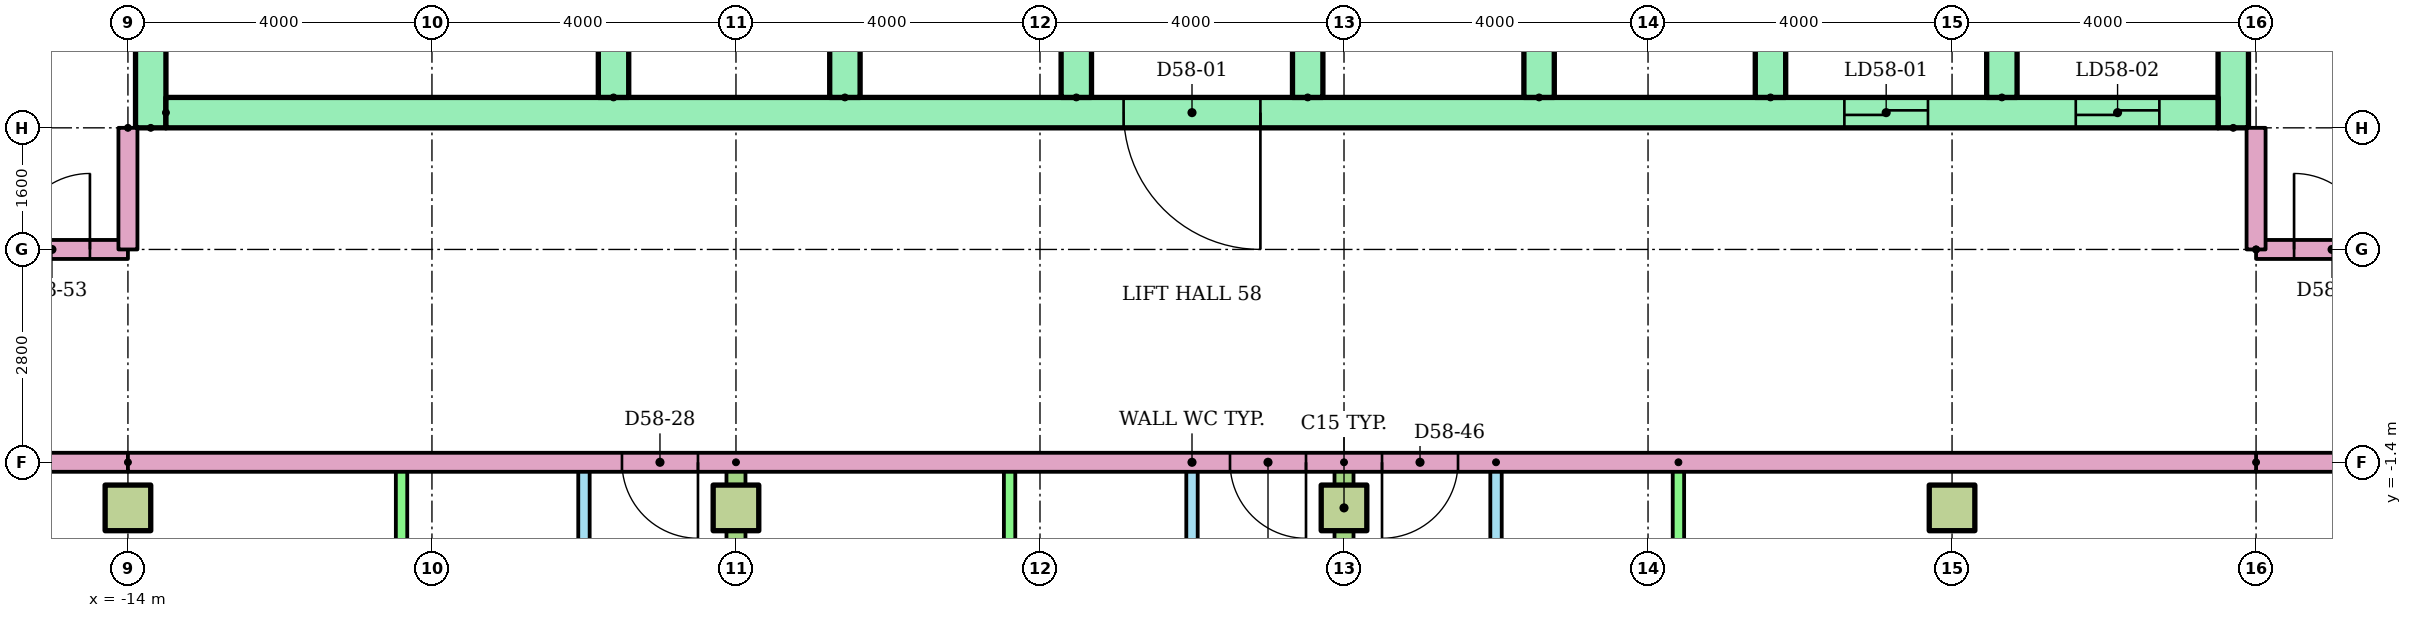
"""IFC4 building model, lengths in metres.
Left out: names, types, materials, properties, quantities, classifications, styles, units other than length and angle.
Written with IfcOpenShell. Run it as: python <this file> out.ifc"""

import sys

from ifc_helpers import new_model, si_unit, direction, frame, frame_2d, origin, origin_2d, place, context, subcontext, project, spatial, rectangle, extrude, element, fill, save


model = new_model("IFC4")
c1 = context("Model", 3, precision=1e-05, world=origin(), true_north=direction((0.0, 1.0)))
c2 = subcontext(c1, "Body", "Model", "MODEL_VIEW")
j1 = project(units=[si_unit("LENGTHUNIT", "METRE"), si_unit("PLANEANGLEUNIT", "RADIAN")], contexts=[c1])
p1 = place(None, origin())
s1 = spatial("IfcSite", under=j1, at=p1, CompositionType="ELEMENT")
p2 = place(p1, origin())
s2 = spatial("IfcBuilding", under=s1, at=p2, CompositionType="ELEMENT")
p3 = place(p2, frame((0.0, 0.0, 223.6)))
s3 = spatial("IfcBuildingStorey", under=s2, at=p3, CompositionType="ELEMENT", Elevation=223.6)
for number, where in (
    (1, (-14.0, -2.0, 0.0)),
    (2, (-6.0, -2.0, 0.0)),
    (3, (2.0, -2.0, 0.0)),
    (4, (10.0, -2.0, 0.0)),
):
    element("IfcColumn", number, at=place(p3, frame(where)), inside=s3, PredefinedType="COLUMN", context=c2, shape_type="SweptSolid", body=[
        extrude(rectangle(XDim=0.6, YDim=0.6, at=origin_2d()), origin(), (0.0, 0.0, 1.0), 3.2),
    ])
for number, where, z_axis, x_axis in (
    (5, (-13.7, 3.0, 0.0), (0.0, 0.0, 1.0), (0.0, 1.0, 0.0)),
    (6, (13.7, 3.0, 0.0), (0.0, 0.0, 1.0), (0.0, 1.0, 0.0)),
):
    element("IfcWall", number, at=place(p3, frame(where, z_axis=z_axis, x_axis=x_axis)), inside=s3, PredefinedType="SHEAR", context=c2, shape_type="SweptSolid", body=[
        extrude(rectangle(XDim=17.0, YDim=0.4, at=frame_2d((8.5, 0.0))), origin(), (0.0, 0.0, 1.0), 2.92),
    ])
p4 = place(p3, frame((-13.5, 3.2, 0.0)))
e7 = element("IfcWall", 7, at=p4, inside=s3, PredefinedType="SHEAR", context=c2, shape_type="SweptSolid", body=[
    extrude(rectangle(XDim=27.0, YDim=0.4, at=frame_2d((13.5, 0.0))), origin(), (0.0, 0.0, 1.0), 2.92),
])
p5 = place(p4, frame((22.083, 0.0, 0.0)))
e8 = element("IfcOpeningElement", 8, at=p5, cuts=e7, PredefinedType="OPENING", context=c2, shape_type="SweptSolid", body=[
    extrude(rectangle(XDim=1.1, YDim=2.1, at=frame_2d((0.55, 1.05))), frame((0.0, 0.21, 0.0), z_axis=(0.0, -1.0, 0.0), x_axis=(1.0, 0.0, 0.0)), (0.0, 0.0, 1.0), 0.42),
])
p6 = place(p4, frame((25.128, 0.0, 0.0)))
e9 = element("IfcOpeningElement", 9, at=p6, cuts=e7, PredefinedType="OPENING", context=c2, shape_type="SweptSolid", body=[
    extrude(rectangle(XDim=1.1, YDim=2.1, at=frame_2d((0.55, 1.05))), frame((0.0, 0.21, 0.0), z_axis=(0.0, -1.0, 0.0), x_axis=(1.0, 0.0, 0.0)), (0.0, 0.0, 1.0), 0.42),
])
p7 = place(p4, frame((12.6, 0.0, 0.0)))
e10 = element("IfcOpeningElement", 10, at=p7, cuts=e7, PredefinedType="OPENING", context=c2, shape_type="SweptSolid", body=[
    extrude(rectangle(XDim=1.8, YDim=2.1, at=frame_2d((0.9, 1.05))), frame((0.0, 0.21, 0.0), z_axis=(0.0, -1.0, 0.0), x_axis=(1.0, 0.0, 0.0)), (0.0, 0.0, 1.0), 0.42),
])
for number, where, z_axis, x_axis in (
    (11, (-7.611, 3.4, 0.0), (0.0, 0.0, 1.0), (0.0, 1.0, 0.0)),
    (12, (-4.567, 3.4, 0.0), (0.0, 0.0, 1.0), (0.0, 1.0, 0.0)),
    (13, (-1.522, 3.4, 0.0), (0.0, 0.0, 1.0), (0.0, 1.0, 0.0)),
    (14, (1.522, 3.4, 0.0), (0.0, 0.0, 1.0), (0.0, 1.0, 0.0)),
    (15, (4.567, 3.4, 0.0), (0.0, 0.0, 1.0), (0.0, 1.0, 0.0)),
    (16, (7.611, 3.4, 0.0), (0.0, 0.0, 1.0), (0.0, 1.0, 0.0)),
    (17, (10.656, 3.4, 0.0), (0.0, 0.0, 1.0), (0.0, 1.0, 0.0)),
):
    element("IfcWall", number, at=place(p3, frame(where, z_axis=z_axis, x_axis=x_axis)), inside=s3, PredefinedType="SHEAR", context=c2, shape_type="SweptSolid", body=[
        extrude(rectangle(XDim=3.0, YDim=0.4, at=frame_2d((1.5, 0.0))), origin(), (0.0, 0.0, 1.0), 2.92),
    ])
p8 = place(p3, frame((-8.0, -9.4, 0.0), z_axis=(0.0, 0.0, 1.0), x_axis=(0.0, 1.0, 0.0)))
e18 = element("IfcWall", 18, at=p8, inside=s3, PredefinedType="PARTITIONING", context=c2, shape_type="SweptSolid", body=[
    extrude(rectangle(XDim=8.0, YDim=0.15, at=frame_2d((4.0, 0.0))), origin(), (0.0, 0.0, 1.0), 2.4),
])
p9 = place(p8, frame((5.3, 0.0, 0.0)))
e19 = element("IfcOpeningElement", 19, at=p9, cuts=e18, PredefinedType="OPENING", context=c2, shape_type="SweptSolid", body=[
    extrude(rectangle(XDim=0.9, YDim=2.1, at=frame_2d((0.45, 1.05))), frame((0.0, 0.085, 0.0), z_axis=(0.0, -1.0, 0.0), x_axis=(1.0, 0.0, 0.0)), (0.0, 0.0, 1.0), 0.17),
])
p10 = place(p8, frame((1.35, 0.0, 0.0)))
e20 = element("IfcOpeningElement", 20, at=p10, cuts=e18, PredefinedType="OPENING", context=c2, shape_type="SweptSolid", body=[
    extrude(rectangle(XDim=0.8, YDim=2.1, at=frame_2d((0.4, 1.05))), frame((0.0, 0.085, 0.0), z_axis=(0.0, -1.0, 0.0), x_axis=(1.0, 0.0, 0.0)), (0.0, 0.0, 1.0), 0.17),
])
p11 = place(p3, frame((-10.4, -9.4, 0.0), z_axis=(0.0, 0.0, 1.0), x_axis=(0.0, 1.0, 0.0)))
e21 = element("IfcWall", 21, at=p11, inside=s3, PredefinedType="PARTITIONING", context=c2, shape_type="SweptSolid", body=[
    extrude(rectangle(XDim=8.0, YDim=0.15, at=frame_2d((4.0, 0.0))), origin(), (0.0, 0.0, 1.0), 2.4),
])
p12 = place(p3, frame((0.0, -9.4, 0.0), z_axis=(0.0, 0.0, 1.0), x_axis=(0.0, 1.0, 0.0)))
e22 = element("IfcWall", 22, at=p12, inside=s3, PredefinedType="PARTITIONING", context=c2, shape_type="SweptSolid", body=[
    extrude(rectangle(XDim=8.0, YDim=0.15, at=frame_2d((4.0, 0.0))), origin(), (0.0, 0.0, 1.0), 2.4),
])
p13 = place(p12, frame((5.3, 0.0, 0.0)))
e23 = element("IfcOpeningElement", 23, at=p13, cuts=e22, PredefinedType="OPENING", context=c2, shape_type="SweptSolid", body=[
    extrude(rectangle(XDim=0.9, YDim=2.1, at=frame_2d((0.45, 1.05))), frame((0.0, 0.085, 0.0), z_axis=(0.0, -1.0, 0.0), x_axis=(1.0, 0.0, 0.0)), (0.0, 0.0, 1.0), 0.17),
])
p14 = place(p12, frame((1.35, 0.0, 0.0)))
e24 = element("IfcOpeningElement", 24, at=p14, cuts=e22, PredefinedType="OPENING", context=c2, shape_type="SweptSolid", body=[
    extrude(rectangle(XDim=0.8, YDim=2.1, at=frame_2d((0.4, 1.05))), frame((0.0, 0.085, 0.0), z_axis=(0.0, -1.0, 0.0), x_axis=(1.0, 0.0, 0.0)), (0.0, 0.0, 1.0), 0.17),
])
p15 = place(p3, frame((-2.4, -9.4, 0.0), z_axis=(0.0, 0.0, 1.0), x_axis=(0.0, 1.0, 0.0)))
e25 = element("IfcWall", 25, at=p15, inside=s3, PredefinedType="PARTITIONING", context=c2, shape_type="SweptSolid", body=[
    extrude(rectangle(XDim=8.0, YDim=0.15, at=frame_2d((4.0, 0.0))), origin(), (0.0, 0.0, 1.0), 2.4),
])
p16 = place(p3, frame((-6.0, -1.4, 0.0), z_axis=(0.0, 0.0, 1.0), x_axis=(0.0, -1.0, 0.0)))
e26 = element("IfcWall", 26, at=p16, inside=s3, PredefinedType="PARTITIONING", context=c2, shape_type="SweptSolid", body=[
    extrude(rectangle(XDim=15.11, YDim=0.25, at=frame_2d((7.555, 0.0))), origin(), (0.0, 0.0, 1.0), 2.4),
])
p17 = place(p3, frame((4.0, -1.4, 0.0), z_axis=(0.0, 0.0, 1.0), x_axis=(0.0, -1.0, 0.0)))
e27 = element("IfcWall", 27, at=p17, inside=s3, PredefinedType="PARTITIONING", context=c2, shape_type="SweptSolid", body=[
    extrude(rectangle(XDim=8.0, YDim=0.15, at=frame_2d((4.0, 0.0))), origin(), (0.0, 0.0, 1.0), 2.4),
])
p18 = place(p17, frame((1.8, 0.0, 0.0)))
e28 = element("IfcOpeningElement", 28, at=p18, cuts=e27, PredefinedType="OPENING", context=c2, shape_type="SweptSolid", body=[
    extrude(rectangle(XDim=0.9, YDim=2.1, at=frame_2d((0.45, 1.05))), frame((0.0, 0.085, 0.0), z_axis=(0.0, -1.0, 0.0), x_axis=(1.0, 0.0, 0.0)), (0.0, 0.0, 1.0), 0.17),
])
p19 = place(p17, frame((5.85, 0.0, 0.0)))
e29 = element("IfcOpeningElement", 29, at=p19, cuts=e27, PredefinedType="OPENING", context=c2, shape_type="SweptSolid", body=[
    extrude(rectangle(XDim=0.8, YDim=2.1, at=frame_2d((0.4, 1.05))), frame((0.0, 0.085, 0.0), z_axis=(0.0, -1.0, 0.0), x_axis=(1.0, 0.0, 0.0)), (0.0, 0.0, 1.0), 0.17),
])
p20 = place(p3, frame((6.4, -1.4, 0.0), z_axis=(0.0, 0.0, 1.0), x_axis=(0.0, -1.0, 0.0)))
e30 = element("IfcWall", 30, at=p20, inside=s3, PredefinedType="PARTITIONING", context=c2, shape_type="SweptSolid", body=[
    extrude(rectangle(XDim=8.0, YDim=0.15, at=frame_2d((4.0, 0.0))), origin(), (0.0, 0.0, 1.0), 2.4),
])
p21 = place(p3, frame((2.0, -1.4, 0.0), z_axis=(0.0, 0.0, 1.0), x_axis=(0.0, -1.0, 0.0)))
e31 = element("IfcWall", 31, at=p21, inside=s3, PredefinedType="PARTITIONING", context=c2, shape_type="SweptSolid", body=[
    extrude(rectangle(XDim=15.11, YDim=0.25, at=frame_2d((7.555, 0.0))), origin(), (0.0, 0.0, 1.0), 2.4),
])
for number, where, z_axis, x_axis in (
    (32, (-14.0, -1.4, 0.0), (0.0, 0.0, 1.0), (-1.0, 0.0, 0.0)),
    (33, (28.92, -1.4, 0.0), (0.0, 0.0, 1.0), (-1.0, 0.0, 0.0)),
):
    element("IfcWall", number, at=place(p3, frame(where, z_axis=z_axis, x_axis=x_axis)), inside=s3, PredefinedType="PARTITIONING", context=c2, shape_type="SweptSolid", body=[
        extrude(rectangle(XDim=14.92, YDim=0.25, at=frame_2d((7.46, 0.0))), origin(), (0.0, 0.0, 1.0), 2.4),
    ])
p22 = place(p3, frame((-28.92, 1.4, 0.0)))
e34 = element("IfcWall", 34, at=p22, inside=s3, PredefinedType="PARTITIONING", context=c2, shape_type="SweptSolid", body=[
    extrude(rectangle(XDim=14.92, YDim=0.25, at=frame_2d((7.46, 0.0))), origin(), (0.0, 0.0, 1.0), 2.4),
])
p23 = place(p22, frame((13.42, 0.0, 0.0)))
e35 = element("IfcOpeningElement", 35, at=p23, cuts=e34, PredefinedType="OPENING", context=c2, shape_type="SweptSolid", body=[
    extrude(rectangle(XDim=1.0, YDim=2.1, at=frame_2d((0.5, 1.05))), frame((0.0, 0.135, 0.0), z_axis=(0.0, -1.0, 0.0), x_axis=(1.0, 0.0, 0.0)), (0.0, 0.0, 1.0), 0.27),
])
p24 = place(p3, frame((14.0, 1.4, 0.0)))
e36 = element("IfcWall", 36, at=p24, inside=s3, PredefinedType="PARTITIONING", context=c2, shape_type="SweptSolid", body=[
    extrude(rectangle(XDim=14.92, YDim=0.25, at=frame_2d((7.46, 0.0))), origin(), (0.0, 0.0, 1.0), 2.4),
])
p25 = place(p24, frame((0.5, 0.0, 0.0)))
e37 = element("IfcOpeningElement", 37, at=p25, cuts=e36, PredefinedType="OPENING", context=c2, shape_type="SweptSolid", body=[
    extrude(rectangle(XDim=1.0, YDim=2.1, at=frame_2d((0.5, 1.05))), frame((0.0, 0.135, 0.0), z_axis=(0.0, -1.0, 0.0), x_axis=(1.0, 0.0, 0.0)), (0.0, 0.0, 1.0), 0.27),
])
p26 = place(p3, frame((14.0, -1.4, 0.0), z_axis=(0.0, 0.0, 1.0), x_axis=(-1.0, 0.0, 0.0)))
e38 = element("IfcWall", 38, at=p26, inside=s3, PredefinedType="PARTITIONING", context=c2, shape_type="SweptSolid", body=[
    extrude(rectangle(XDim=28.0, YDim=0.25, at=frame_2d((14.0, 0.0))), origin(), (0.0, 0.0, 1.0), 2.4),
])
p27 = place(p26, frame((20.5, 0.0, 0.0)))
e39 = element("IfcOpeningElement", 39, at=p27, cuts=e38, PredefinedType="OPENING", context=c2, shape_type="SweptSolid", body=[
    extrude(rectangle(XDim=1.0, YDim=2.1, at=frame_2d((0.5, 1.05))), frame((0.0, 0.135, 0.0), z_axis=(0.0, -1.0, 0.0), x_axis=(1.0, 0.0, 0.0)), (0.0, 0.0, 1.0), 0.27),
])
p28 = place(p26, frame((12.5, 0.0, 0.0)))
e40 = element("IfcOpeningElement", 40, at=p28, cuts=e38, PredefinedType="OPENING", context=c2, shape_type="SweptSolid", body=[
    extrude(rectangle(XDim=1.0, YDim=2.1, at=frame_2d((0.5, 1.05))), frame((0.0, 0.135, 0.0), z_axis=(0.0, -1.0, 0.0), x_axis=(1.0, 0.0, 0.0)), (0.0, 0.0, 1.0), 0.27),
])
p29 = place(p26, frame((10.5, 0.0, 0.0)))
e41 = element("IfcOpeningElement", 41, at=p29, cuts=e38, PredefinedType="OPENING", context=c2, shape_type="SweptSolid", body=[
    extrude(rectangle(XDim=1.0, YDim=2.1, at=frame_2d((0.5, 1.05))), frame((0.0, 0.135, 0.0), z_axis=(0.0, -1.0, 0.0), x_axis=(1.0, 0.0, 0.0)), (0.0, 0.0, 1.0), 0.27),
])
for number, where, z_axis, x_axis in (
    (42, (-14.0, 3.0, 0.0), (0.0, 0.0, 1.0), (0.0, -1.0, 0.0)),
    (43, (14.0, 1.4, 0.0), (0.0, 0.0, 1.0), (0.0, 1.0, 0.0)),
):
    element("IfcWall", number, at=place(p3, frame(where, z_axis=z_axis, x_axis=x_axis)), inside=s3, PredefinedType="PARTITIONING", context=c2, shape_type="SweptSolid", body=[
        extrude(rectangle(XDim=1.6, YDim=0.25, at=frame_2d((0.8, 0.0))), origin(), (0.0, 0.0, 1.0), 2.4),
    ])
p30 = place(p5, origin())
e44 = element("IfcDoor", 44, at=p30, inside=s3, OperationType="SLIDING_TO_LEFT", PredefinedType="DOOR", context=c2, shape_type="SweptSolid", body=[
    extrude(rectangle(XDim=1.1, YDim=2.1, at=frame_2d((0.55, 1.05))), frame((0.0, 0.025, 0.0), z_axis=(0.0, -1.0, 0.0), x_axis=(1.0, 0.0, 0.0)), (0.0, 0.0, 1.0), 0.05),
])
fill(e8, e44)
p31 = place(p6, origin())
e45 = element("IfcDoor", 45, at=p31, inside=s3, OperationType="SLIDING_TO_LEFT", PredefinedType="DOOR", context=c2, shape_type="SweptSolid", body=[
    extrude(rectangle(XDim=1.1, YDim=2.1, at=frame_2d((0.55, 1.05))), frame((0.0, 0.025, 0.0), z_axis=(0.0, -1.0, 0.0), x_axis=(1.0, 0.0, 0.0)), (0.0, 0.0, 1.0), 0.05),
])
fill(e9, e45)
p32 = place(p7, frame((1.8, 0.0, 0.0), z_axis=(0.0, 0.0, 1.0), x_axis=(-1.0, 0.0, 0.0)))
e46 = element("IfcDoor", 46, at=p32, inside=s3, OperationType="DOUBLE_DOOR_SINGLE_SWING", PredefinedType="DOOR", context=c2, shape_type="SweptSolid", body=[
    extrude(rectangle(XDim=1.8, YDim=2.1, at=frame_2d((0.9, 1.05))), frame((0.0, 0.025, 0.0), z_axis=(0.0, -1.0, 0.0), x_axis=(1.0, 0.0, 0.0)), (0.0, 0.0, 1.0), 0.05),
])
fill(e10, e46)
p33 = place(p27, origin())
e47 = element("IfcDoor", 47, at=p33, inside=s3, OperationType="SINGLE_SWING_LEFT", PredefinedType="DOOR", context=c2, shape_type="SweptSolid", body=[
    extrude(rectangle(XDim=1.0, YDim=2.1, at=frame_2d((0.5, 1.05))), frame((0.0, 0.025, 0.0), z_axis=(0.0, -1.0, 0.0), x_axis=(1.0, 0.0, 0.0)), (0.0, 0.0, 1.0), 0.05),
])
fill(e39, e47)
p34 = place(p28, origin())
e48 = element("IfcDoor", 48, at=p34, inside=s3, OperationType="SINGLE_SWING_LEFT", PredefinedType="DOOR", context=c2, shape_type="SweptSolid", body=[
    extrude(rectangle(XDim=1.0, YDim=2.1, at=frame_2d((0.5, 1.05))), frame((0.0, 0.025, 0.0), z_axis=(0.0, -1.0, 0.0), x_axis=(1.0, 0.0, 0.0)), (0.0, 0.0, 1.0), 0.05),
])
fill(e40, e48)
p35 = place(p29, origin())
e49 = element("IfcDoor", 49, at=p35, inside=s3, OperationType="SINGLE_SWING_RIGHT", PredefinedType="DOOR", context=c2, shape_type="SweptSolid", body=[
    extrude(rectangle(XDim=1.0, YDim=2.1, at=frame_2d((0.5, 1.05))), frame((0.0, 0.025, 0.0), z_axis=(0.0, -1.0, 0.0), x_axis=(1.0, 0.0, 0.0)), (0.0, 0.0, 1.0), 0.05),
])
fill(e41, e49)
p36 = place(p23, origin())
e50 = element("IfcDoor", 50, at=p36, inside=s3, OperationType="SINGLE_SWING_RIGHT", PredefinedType="DOOR", context=c2, shape_type="SweptSolid", body=[
    extrude(rectangle(XDim=1.0, YDim=2.1, at=frame_2d((0.5, 1.05))), frame((0.0, 0.025, 0.0), z_axis=(0.0, -1.0, 0.0), x_axis=(1.0, 0.0, 0.0)), (0.0, 0.0, 1.0), 0.05),
])
fill(e35, e50)
p37 = place(p25, origin())
e51 = element("IfcDoor", 51, at=p37, inside=s3, OperationType="SINGLE_SWING_LEFT", PredefinedType="DOOR", context=c2, shape_type="SweptSolid", body=[
    extrude(rectangle(XDim=1.0, YDim=2.1, at=frame_2d((0.5, 1.05))), frame((0.0, 0.025, 0.0), z_axis=(0.0, -1.0, 0.0), x_axis=(1.0, 0.0, 0.0)), (0.0, 0.0, 1.0), 0.05),
])
fill(e37, e51)
save(model, sys.argv[1])
